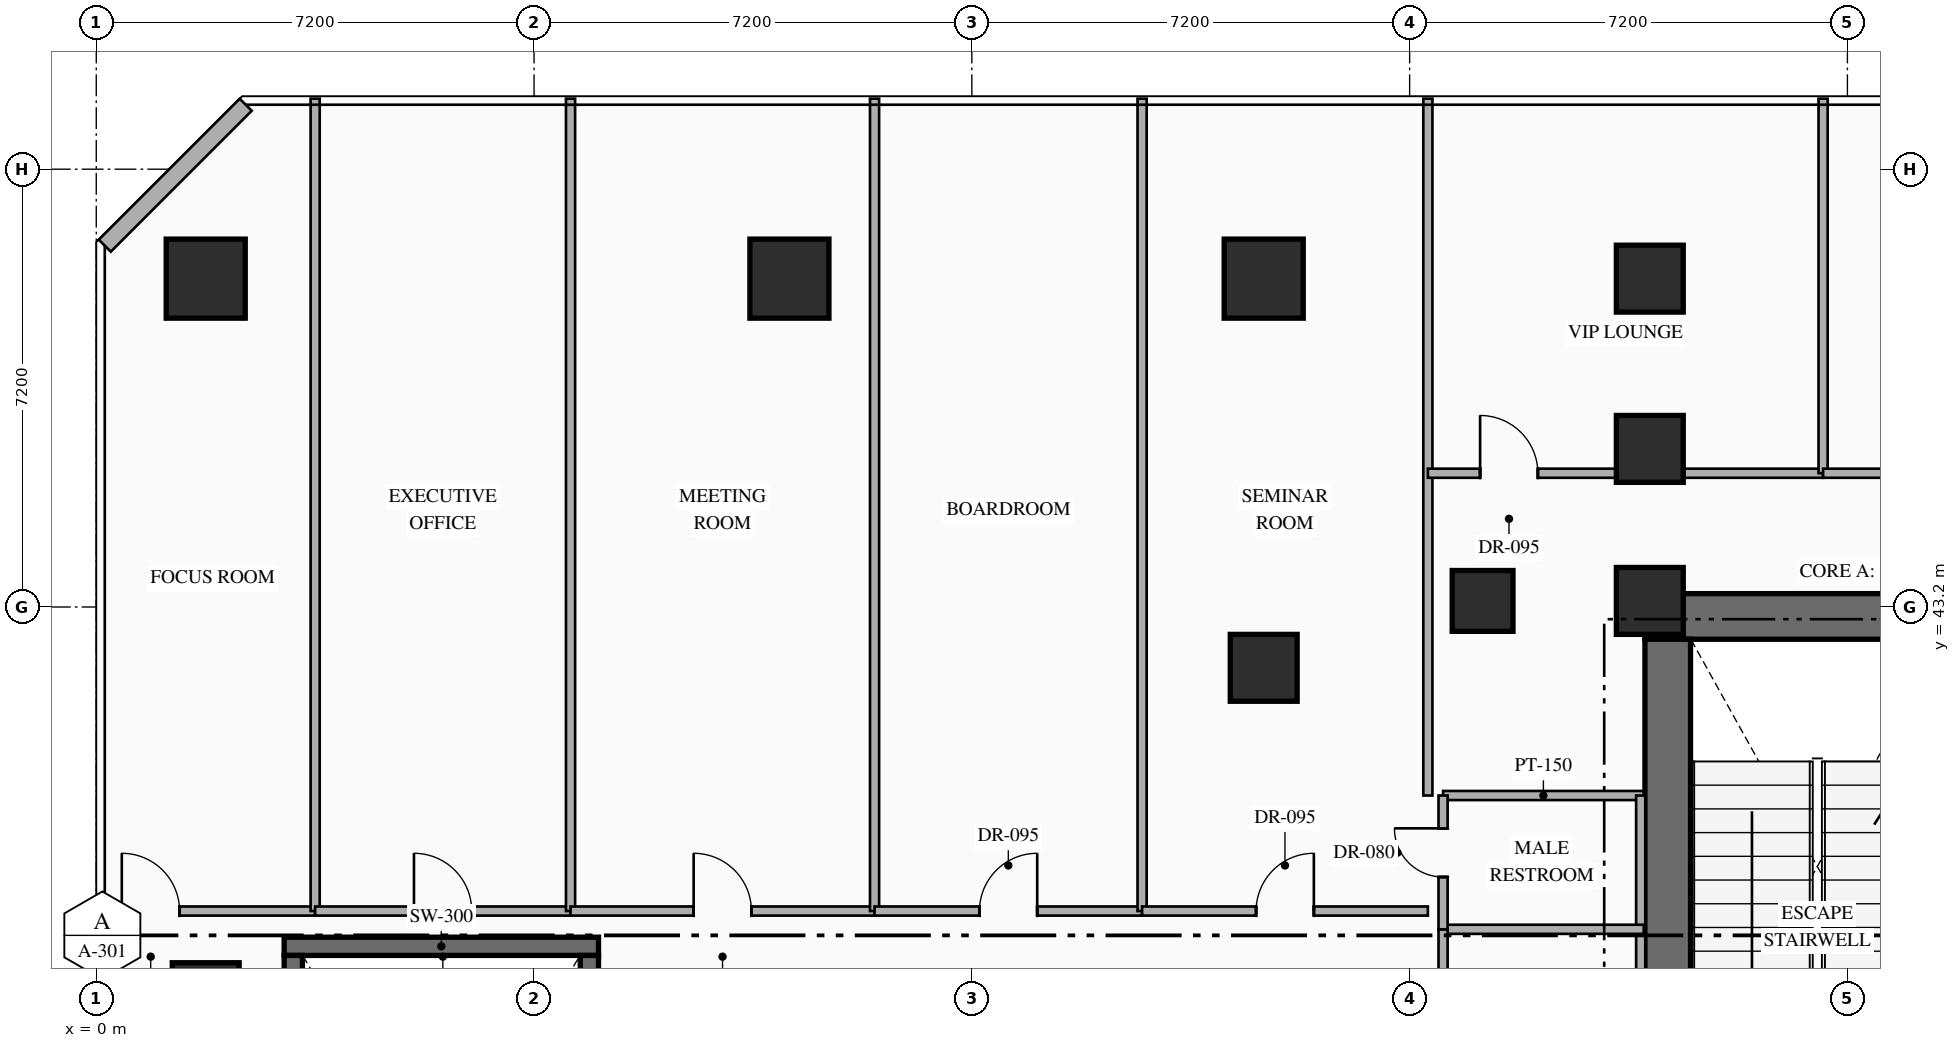
"""IFC4 building model, lengths in metres.
Left out: names, types, materials, properties, quantities, classifications, styles, units other than length and angle.
Written with IfcOpenShell. Run it as: python <this file> out.ifc"""

import sys

from ifc_helpers import new_model, si_unit, direction, frame, frame_2d, origin, origin_2d, place, context, subcontext, project, spatial, rectangle, hollow_rectangle, extrude, element, fill, save


model = new_model("IFC4")
c1 = context("Model", 3, precision=1e-05, world=origin(), true_north=direction((0.0, 1.0)))
c2 = subcontext(c1, "Body", "Model", "MODEL_VIEW")
j1 = project(units=[si_unit("LENGTHUNIT", "METRE"), si_unit("PLANEANGLEUNIT", "RADIAN")], contexts=[c1])
p1 = place(None, origin())
s1 = spatial("IfcSite", under=j1, at=p1, CompositionType="ELEMENT")
p2 = place(p1, origin())
s2 = spatial("IfcBuilding", under=s1, at=p2, CompositionType="ELEMENT")
p3 = place(p2, frame((0.0, 0.0, 21.6)))
s3 = spatial("IfcBuildingStorey", under=s2, at=p3, CompositionType="ELEMENT", Elevation=21.6)
p4 = place(p3, frame((25.47, 43.045, 0.0), z_axis=(0.0, 0.0, 1.0), x_axis=(1.0, 0.0, 0.0)))
e1 = element("IfcWall", 1, at=p4, inside=s3, PredefinedType="SHEAR", context=c2, shape_type="SweptSolid", body=[
    extrude(rectangle(XDim=8.08, YDim=0.75, at=frame_2d((4.04, 0.0))), origin(), (0.0, 0.0, 1.0), 5.4),
])
p5 = place(p3, frame((25.845, 33.19, 0.0), z_axis=(0.0, 0.0, 1.0), x_axis=(0.0, 1.0, 0.0)))
e2 = element("IfcWall", 2, at=p5, inside=s3, PredefinedType="SHEAR", context=c2, shape_type="SweptSolid", body=[
    extrude(rectangle(XDim=9.48, YDim=0.75, at=frame_2d((4.74, 0.0))), origin(), (0.0, 0.0, 1.0), 5.4),
])
p6 = place(p3, frame((3.09, 37.62, 0.0), z_axis=(0.0, 0.0, 1.0), x_axis=(1.0, 0.0, 0.0)))
e3 = element("IfcWall", 3, at=p6, inside=s3, PredefinedType="SHEAR", context=c2, shape_type="SweptSolid", body=[
    extrude(rectangle(XDim=5.17, YDim=0.3, at=frame_2d((2.585, 0.0))), origin(), (0.0, 0.0, 1.0), 5.1),
])
for number, where, z_axis, x_axis in (
    (4, (3.24, 27.59, 0.0), (0.0, 0.0, 1.0), (0.0, 1.0, 0.0)),
    (5, (8.11, 27.59, 0.0), (0.0, 0.0, 1.0), (0.0, 1.0, 0.0)),
):
    element("IfcWall", number, at=place(p3, frame(where, z_axis=z_axis, x_axis=x_axis)), inside=s3, PredefinedType="SHEAR", context=c2, shape_type="SweptSolid", body=[
        extrude(rectangle(XDim=9.88, YDim=0.3, at=frame_2d((4.94, 0.0))), origin(), (0.0, 0.0, 1.0), 5.1),
    ])
p7 = place(p3, frame((25.55, 43.3, 0.0), z_axis=(0.0, 0.0, 1.0), x_axis=(1.0, 0.0, 0.0)))
e6 = element("IfcColumn", 6, at=p7, inside=s3, PredefinedType="COLUMN", context=c2, shape_type="SweptSolid", body=[
    extrude(rectangle(XDim=1.1, YDim=1.1, at=origin_2d()), origin(), (0.0, 0.0, 1.0), 5.4),
])
p8 = place(p3, frame((25.55, 45.8, 0.0), z_axis=(0.0, 0.0, 1.0), x_axis=(1.0, 0.0, 0.0)))
e7 = element("IfcColumn", 7, at=p8, inside=s3, PredefinedType="COLUMN", context=c2, shape_type="SweptSolid", body=[
    extrude(hollow_rectangle(XDim=1.1, YDim=1.1, WallThickness=0.04, at=origin_2d()), origin(), (0.0, 0.0, 1.0), 5.4),
])
p9 = place(p3, frame((1.8, 48.6, 0.0), z_axis=(0.0, 0.0, 1.0), x_axis=(1.0, 0.0, 0.0)))
e8 = element("IfcColumn", 8, at=p9, inside=s3, PredefinedType="COLUMN", context=c2, shape_type="SweptSolid", body=[
    extrude(rectangle(XDim=1.3, YDim=1.3, at=origin_2d()), origin(), (0.0, 0.0, 1.0), 5.4),
])
p10 = place(p3, frame((1.8, 36.8, 0.0), z_axis=(0.0, 0.0, 1.0), x_axis=(1.0, 0.0, 0.0)))
e9 = element("IfcColumn", 9, at=p10, inside=s3, PredefinedType="COLUMN", context=c2, shape_type="SweptSolid", body=[
    extrude(hollow_rectangle(XDim=1.1, YDim=1.1, WallThickness=0.04, at=origin_2d()), origin(), (0.0, 0.0, 1.0), 5.4),
])
for number, where, z_axis, x_axis in (
    (10, (11.4, 48.6, 0.0), (0.0, 0.0, 1.0), (1.0, 0.0, 0.0)),
    (11, (19.2, 48.6, 0.0), (0.0, 0.0, 1.0), (1.0, 0.0, 0.0)),
):
    element("IfcColumn", number, at=place(p3, frame(where, z_axis=z_axis, x_axis=x_axis)), inside=s3, PredefinedType="COLUMN", context=c2, shape_type="SweptSolid", body=[
        extrude(rectangle(XDim=1.3, YDim=1.3, at=origin_2d()), origin(), (0.0, 0.0, 1.0), 5.4),
    ])
for number, where, z_axis, x_axis in (
    (12, (25.55, 48.6, 0.0), (0.0, 0.0, 1.0), (1.0, 0.0, 0.0)),
    (13, (19.2, 42.2, 0.0), (0.0, 0.0, 1.0), (1.0, 0.0, 0.0)),
):
    element("IfcColumn", number, at=place(p3, frame(where, z_axis=z_axis, x_axis=x_axis)), inside=s3, PredefinedType="COLUMN", context=c2, shape_type="SweptSolid", body=[
        extrude(hollow_rectangle(XDim=1.1, YDim=1.1, WallThickness=0.04, at=origin_2d()), origin(), (0.0, 0.0, 1.0), 5.4),
    ])
p11 = place(p3, frame((22.8, 43.3, 0.0), z_axis=(0.0, 0.0, 1.0), x_axis=(1.0, 0.0, 0.0)))
e14 = element("IfcColumn", 14, at=p11, inside=s3, PredefinedType="COLUMN", context=c2, shape_type="SweptSolid", body=[
    extrude(hollow_rectangle(XDim=1.0, YDim=1.0, WallThickness=0.038, at=origin_2d()), origin(), (0.0, 0.0, 1.0), 5.4),
])
p12 = place(p3, frame((0.14, 49.142, 0.0), z_axis=(0.0, 0.0, 1.0), x_axis=(0.707144017911, 0.707069542501, 0.0)))
e15 = element("IfcWall", 15, at=p12, inside=s3, PredefinedType="STANDARD", context=c2, shape_type="SweptSolid", body=[
    extrude(rectangle(XDim=3.278, YDim=0.28, at=frame_2d((1.639, 0.0))), origin(), (0.0, 0.0, 1.0), 5.1),
])
p13 = place(p3, frame((22.15, 40.1, 0.0), z_axis=(0.0, 0.0, 1.0), x_axis=(1.0, 0.0, 0.0)))
e16 = element("IfcWall", 16, at=p13, inside=s3, PredefinedType="PARTITIONING", context=c2, shape_type="SweptSolid", body=[
    extrude(rectangle(XDim=3.3, YDim=0.15, at=frame_2d((1.65, 0.0))), origin(), (0.0, 0.0, 1.0), 5.1),
])
p14 = place(p3, frame((25.4, 33.5, 0.0), z_axis=(0.0, 0.0, 1.0), x_axis=(0.0, 1.0, 0.0)))
e17 = element("IfcWall", 17, at=p14, inside=s3, PredefinedType="PARTITIONING", context=c2, shape_type="SweptSolid", body=[
    extrude(rectangle(XDim=6.6, YDim=0.15, at=frame_2d((3.3, 0.0))), origin(), (0.0, 0.0, 1.0), 5.1),
])
p15 = place(p3, frame((22.15, 37.9, 0.0), z_axis=(0.0, 0.0, 1.0), x_axis=(1.0, 0.0, 0.0)))
e18 = element("IfcWall", 18, at=p15, inside=s3, PredefinedType="PARTITIONING", context=c2, shape_type="SweptSolid", body=[
    extrude(rectangle(XDim=3.3, YDim=0.15, at=frame_2d((1.65, 0.0))), origin(), (0.0, 0.0, 1.0), 5.1),
])
p16 = place(p3, frame((22.15, 35.7, 0.0), z_axis=(0.0, 0.0, 1.0), x_axis=(0.0, 1.0, 0.0)))
e19 = element("IfcWall", 19, at=p16, inside=s3, PredefinedType="PARTITIONING", context=c2, shape_type="SweptSolid", body=[
    extrude(rectangle(XDim=2.2, YDim=0.15, at=frame_2d((1.1, 0.0))), origin(), (0.0, 0.0, 1.0), 5.1),
])
p17 = place(p16, frame((0.7, 0.0, 0.0)))
e20 = element("IfcOpeningElement", 20, at=p17, cuts=e19, PredefinedType="OPENING", context=c2, shape_type="SweptSolid", body=[
    extrude(rectangle(XDim=0.8, YDim=2.06, at=frame_2d((0.4, 1.03))), frame((0.0, 0.085, 0.0), z_axis=(0.0, -1.0, 0.0), x_axis=(1.0, 0.0, 0.0)), (0.0, 0.0, 1.0), 0.17),
])
p18 = place(p3, frame((22.15, 37.9, 0.0), z_axis=(0.0, 0.0, 1.0), x_axis=(0.0, 1.0, 0.0)))
e21 = element("IfcWall", 21, at=p18, inside=s3, PredefinedType="PARTITIONING", context=c2, shape_type="SweptSolid", body=[
    extrude(rectangle(XDim=2.2, YDim=0.15, at=frame_2d((1.1, 0.0))), origin(), (0.0, 0.0, 1.0), 5.1),
])
p19 = place(p18, frame((0.86, 0.0, 0.0)))
e22 = element("IfcOpeningElement", 22, at=p19, cuts=e21, PredefinedType="OPENING", context=c2, shape_type="SweptSolid", body=[
    extrude(rectangle(XDim=0.8, YDim=2.06, at=frame_2d((0.4, 1.03))), frame((0.0, 0.085, 0.0), z_axis=(0.0, -1.0, 0.0), x_axis=(1.0, 0.0, 0.0)), (0.0, 0.0, 1.0), 0.17),
])
p20 = place(p3, frame((0.04, 38.2, 0.0), z_axis=(0.0, 0.0, 1.0), x_axis=(1.0, 0.0, 0.0)))
e23 = element("IfcWall", 23, at=p20, inside=s3, PredefinedType="PARTITIONING", context=c2, shape_type="SweptSolid", body=[
    extrude(rectangle(XDim=3.56, YDim=0.15, at=frame_2d((1.78, 0.0))), origin(), (0.0, 0.0, 1.0), 5.1),
])
p21 = place(p20, frame((0.38, 0.0, 0.0)))
e24 = element("IfcOpeningElement", 24, at=p21, cuts=e23, PredefinedType="OPENING", context=c2, shape_type="SweptSolid", body=[
    extrude(rectangle(XDim=0.95, YDim=2.15, at=frame_2d((0.475, 1.075))), frame((0.0, 0.085, 0.0), z_axis=(0.0, -1.0, 0.0), x_axis=(1.0, 0.0, 0.0)), (0.0, 0.0, 1.0), 0.17),
])
p22 = place(p3, frame((3.6, 38.2, 0.0), z_axis=(0.0, 0.0, 1.0), x_axis=(0.0, 1.0, 0.0)))
e25 = element("IfcWall", 25, at=p22, inside=s3, PredefinedType="PARTITIONING", context=c2, shape_type="SweptSolid", body=[
    extrude(rectangle(XDim=13.36, YDim=0.15, at=frame_2d((6.68, 0.0))), origin(), (0.0, 0.0, 1.0), 5.1),
])
p23 = place(p3, frame((3.6, 38.2, 0.0), z_axis=(0.0, 0.0, 1.0), x_axis=(1.0, 0.0, 0.0)))
e26 = element("IfcWall", 26, at=p23, inside=s3, PredefinedType="PARTITIONING", context=c2, shape_type="SweptSolid", body=[
    extrude(rectangle(XDim=4.2, YDim=0.15, at=frame_2d((2.1, 0.0))), origin(), (0.0, 0.0, 1.0), 5.1),
])
p24 = place(p23, frame((1.625, 0.0, 0.0)))
e27 = element("IfcOpeningElement", 27, at=p24, cuts=e26, PredefinedType="OPENING", context=c2, shape_type="SweptSolid", body=[
    extrude(rectangle(XDim=0.95, YDim=2.15, at=frame_2d((0.475, 1.075))), frame((0.0, 0.085, 0.0), z_axis=(0.0, -1.0, 0.0), x_axis=(1.0, 0.0, 0.0)), (0.0, 0.0, 1.0), 0.17),
])
p25 = place(p3, frame((7.8, 38.2, 0.0), z_axis=(0.0, 0.0, 1.0), x_axis=(0.0, 1.0, 0.0)))
e28 = element("IfcWall", 28, at=p25, inside=s3, PredefinedType="PARTITIONING", context=c2, shape_type="SweptSolid", body=[
    extrude(rectangle(XDim=13.36, YDim=0.15, at=frame_2d((6.68, 0.0))), origin(), (0.0, 0.0, 1.0), 5.1),
])
p26 = place(p3, frame((7.8, 38.2, 0.0), z_axis=(0.0, 0.0, 1.0), x_axis=(1.0, 0.0, 0.0)))
e29 = element("IfcWall", 29, at=p26, inside=s3, PredefinedType="PARTITIONING", context=c2, shape_type="SweptSolid", body=[
    extrude(rectangle(XDim=5.0, YDim=0.15, at=frame_2d((2.5, 0.0))), origin(), (0.0, 0.0, 1.0), 5.1),
])
p27 = place(p26, frame((2.025, 0.0, 0.0)))
e30 = element("IfcOpeningElement", 30, at=p27, cuts=e29, PredefinedType="OPENING", context=c2, shape_type="SweptSolid", body=[
    extrude(rectangle(XDim=0.95, YDim=2.15, at=frame_2d((0.475, 1.075))), frame((0.0, 0.085, 0.0), z_axis=(0.0, -1.0, 0.0), x_axis=(1.0, 0.0, 0.0)), (0.0, 0.0, 1.0), 0.17),
])
p28 = place(p3, frame((12.8, 38.2, 0.0), z_axis=(0.0, 0.0, 1.0), x_axis=(0.0, 1.0, 0.0)))
e31 = element("IfcWall", 31, at=p28, inside=s3, PredefinedType="PARTITIONING", context=c2, shape_type="SweptSolid", body=[
    extrude(rectangle(XDim=13.36, YDim=0.15, at=frame_2d((6.68, 0.0))), origin(), (0.0, 0.0, 1.0), 5.1),
])
p29 = place(p3, frame((12.8, 38.2, 0.0), z_axis=(0.0, 0.0, 1.0), x_axis=(1.0, 0.0, 0.0)))
e32 = element("IfcWall", 32, at=p29, inside=s3, PredefinedType="PARTITIONING", context=c2, shape_type="SweptSolid", body=[
    extrude(rectangle(XDim=4.4, YDim=0.15, at=frame_2d((2.2, 0.0))), origin(), (0.0, 0.0, 1.0), 5.1),
])
p30 = place(p29, frame((1.725, 0.0, 0.0)))
e33 = element("IfcOpeningElement", 33, at=p30, cuts=e32, PredefinedType="OPENING", context=c2, shape_type="SweptSolid", body=[
    extrude(rectangle(XDim=0.95, YDim=2.15, at=frame_2d((0.475, 1.075))), frame((0.0, 0.085, 0.0), z_axis=(0.0, -1.0, 0.0), x_axis=(1.0, 0.0, 0.0)), (0.0, 0.0, 1.0), 0.17),
])
p31 = place(p3, frame((17.2, 38.2, 0.0), z_axis=(0.0, 0.0, 1.0), x_axis=(0.0, 1.0, 0.0)))
e34 = element("IfcWall", 34, at=p31, inside=s3, PredefinedType="PARTITIONING", context=c2, shape_type="SweptSolid", body=[
    extrude(rectangle(XDim=13.36, YDim=0.15, at=frame_2d((6.68, 0.0))), origin(), (0.0, 0.0, 1.0), 5.1),
])
p32 = place(p3, frame((17.2, 38.2, 0.0), z_axis=(0.0, 0.0, 1.0), x_axis=(1.0, 0.0, 0.0)))
e35 = element("IfcWall", 35, at=p32, inside=s3, PredefinedType="PARTITIONING", context=c2, shape_type="SweptSolid", body=[
    extrude(rectangle(XDim=4.7, YDim=0.15, at=frame_2d((2.35, 0.0))), origin(), (0.0, 0.0, 1.0), 5.1),
])
p33 = place(p32, frame((1.875, 0.0, 0.0)))
e36 = element("IfcOpeningElement", 36, at=p33, cuts=e35, PredefinedType="OPENING", context=c2, shape_type="SweptSolid", body=[
    extrude(rectangle(XDim=0.95, YDim=2.15, at=frame_2d((0.475, 1.075))), frame((0.0, 0.085, 0.0), z_axis=(0.0, -1.0, 0.0), x_axis=(1.0, 0.0, 0.0)), (0.0, 0.0, 1.0), 0.17),
])
p34 = place(p3, frame((21.9, 40.1, 0.0), z_axis=(0.0, 0.0, 1.0), x_axis=(0.0, 1.0, 0.0)))
e37 = element("IfcWall", 37, at=p34, inside=s3, PredefinedType="PARTITIONING", context=c2, shape_type="SweptSolid", body=[
    extrude(rectangle(XDim=11.46, YDim=0.15, at=frame_2d((5.73, 0.0))), origin(), (0.0, 0.0, 1.0), 5.1),
])
p35 = place(p3, frame((21.9, 45.4, 0.0), z_axis=(0.0, 0.0, 1.0), x_axis=(1.0, 0.0, 0.0)))
e38 = element("IfcWall", 38, at=p35, inside=s3, PredefinedType="PARTITIONING", context=c2, shape_type="SweptSolid", body=[
    extrude(rectangle(XDim=6.5, YDim=0.15, at=frame_2d((3.25, 0.0))), origin(), (0.0, 0.0, 1.0), 5.1),
])
p36 = place(p35, frame((0.859, 0.0, 0.0)))
e39 = element("IfcOpeningElement", 39, at=p36, cuts=e38, PredefinedType="OPENING", context=c2, shape_type="SweptSolid", body=[
    extrude(rectangle(XDim=0.95, YDim=2.15, at=frame_2d((0.475, 1.075))), frame((0.0, 0.085, 0.0), z_axis=(0.0, -1.0, 0.0), x_axis=(1.0, 0.0, 0.0)), (0.0, 0.0, 1.0), 0.17),
])
p37 = place(p3, frame((28.4, 45.4, 0.0), z_axis=(0.0, 0.0, 1.0), x_axis=(0.0, 1.0, 0.0)))
e40 = element("IfcWall", 40, at=p37, inside=s3, PredefinedType="PARTITIONING", context=c2, shape_type="SweptSolid", body=[
    extrude(rectangle(XDim=6.16, YDim=0.15, at=frame_2d((3.08, 0.0))), origin(), (0.0, 0.0, 1.0), 5.1),
])
p38 = place(p3, frame((28.4, 45.4, 0.0), z_axis=(0.0, 0.0, 1.0), x_axis=(1.0, 0.0, 0.0)))
e41 = element("IfcWall", 41, at=p38, inside=s3, PredefinedType="PARTITIONING", context=c2, shape_type="SweptSolid", body=[
    extrude(rectangle(XDim=7.8, YDim=0.15, at=frame_2d((3.9, 0.0))), origin(), (0.0, 0.0, 1.0), 5.1),
])
p39 = place(p38, frame((2.192, 0.0, 0.0)))
e42 = element("IfcOpeningElement", 42, at=p39, cuts=e41, PredefinedType="OPENING", context=c2, shape_type="SweptSolid", body=[
    extrude(rectangle(XDim=1.0, YDim=2.15, at=frame_2d((0.5, 1.075))), frame((0.0, 0.085, 0.0), z_axis=(0.0, -1.0, 0.0), x_axis=(1.0, 0.0, 0.0)), (0.0, 0.0, 1.0), 0.17),
])
p40 = place(p19, origin())
e43 = element("IfcDoor", 43, at=p40, inside=s3, OperationType="SINGLE_SWING_RIGHT", PredefinedType="DOOR", context=c2, shape_type="SweptSolid", body=[
    extrude(rectangle(XDim=0.8, YDim=2.06, at=frame_2d((0.4, 1.03))), frame((0.0, 0.025, 0.0), z_axis=(0.0, -1.0, 0.0), x_axis=(1.0, 0.0, 0.0)), (0.0, 0.0, 1.0), 0.05),
])
fill(e22, e43)
p41 = place(p21, origin())
e44 = element("IfcDoor", 44, at=p41, inside=s3, OperationType="SINGLE_SWING_LEFT", PredefinedType="DOOR", context=c2, shape_type="SweptSolid", body=[
    extrude(rectangle(XDim=0.95, YDim=2.15, at=frame_2d((0.475, 1.075))), frame((0.0, 0.025, 0.0), z_axis=(0.0, -1.0, 0.0), x_axis=(1.0, 0.0, 0.0)), (0.0, 0.0, 1.0), 0.05),
])
fill(e24, e44)
p42 = place(p24, origin())
e45 = element("IfcDoor", 45, at=p42, inside=s3, OperationType="SINGLE_SWING_LEFT", PredefinedType="DOOR", context=c2, shape_type="SweptSolid", body=[
    extrude(rectangle(XDim=0.95, YDim=2.15, at=frame_2d((0.475, 1.075))), frame((0.0, 0.025, 0.0), z_axis=(0.0, -1.0, 0.0), x_axis=(1.0, 0.0, 0.0)), (0.0, 0.0, 1.0), 0.05),
])
fill(e27, e45)
p43 = place(p27, origin())
e46 = element("IfcDoor", 46, at=p43, inside=s3, OperationType="SINGLE_SWING_LEFT", PredefinedType="DOOR", context=c2, shape_type="SweptSolid", body=[
    extrude(rectangle(XDim=0.95, YDim=2.15, at=frame_2d((0.475, 1.075))), frame((0.0, 0.025, 0.0), z_axis=(0.0, -1.0, 0.0), x_axis=(1.0, 0.0, 0.0)), (0.0, 0.0, 1.0), 0.05),
])
fill(e30, e46)
p44 = place(p30, origin())
e47 = element("IfcDoor", 47, at=p44, inside=s3, OperationType="SINGLE_SWING_RIGHT", PredefinedType="DOOR", context=c2, shape_type="SweptSolid", body=[
    extrude(rectangle(XDim=0.95, YDim=2.15, at=frame_2d((0.475, 1.075))), frame((0.0, 0.025, 0.0), z_axis=(0.0, -1.0, 0.0), x_axis=(1.0, 0.0, 0.0)), (0.0, 0.0, 1.0), 0.05),
])
fill(e33, e47)
p45 = place(p33, origin())
e48 = element("IfcDoor", 48, at=p45, inside=s3, OperationType="SINGLE_SWING_RIGHT", PredefinedType="DOOR", context=c2, shape_type="SweptSolid", body=[
    extrude(rectangle(XDim=0.95, YDim=2.15, at=frame_2d((0.475, 1.075))), frame((0.0, 0.025, 0.0), z_axis=(0.0, -1.0, 0.0), x_axis=(1.0, 0.0, 0.0)), (0.0, 0.0, 1.0), 0.05),
])
fill(e36, e48)
p46 = place(p36, origin())
e49 = element("IfcDoor", 49, at=p46, inside=s3, OperationType="SINGLE_SWING_LEFT", PredefinedType="DOOR", context=c2, shape_type="SweptSolid", body=[
    extrude(rectangle(XDim=0.95, YDim=2.15, at=frame_2d((0.475, 1.075))), frame((0.0, 0.025, 0.0), z_axis=(0.0, -1.0, 0.0), x_axis=(1.0, 0.0, 0.0)), (0.0, 0.0, 1.0), 0.05),
])
fill(e39, e49)
save(model, sys.argv[1])
